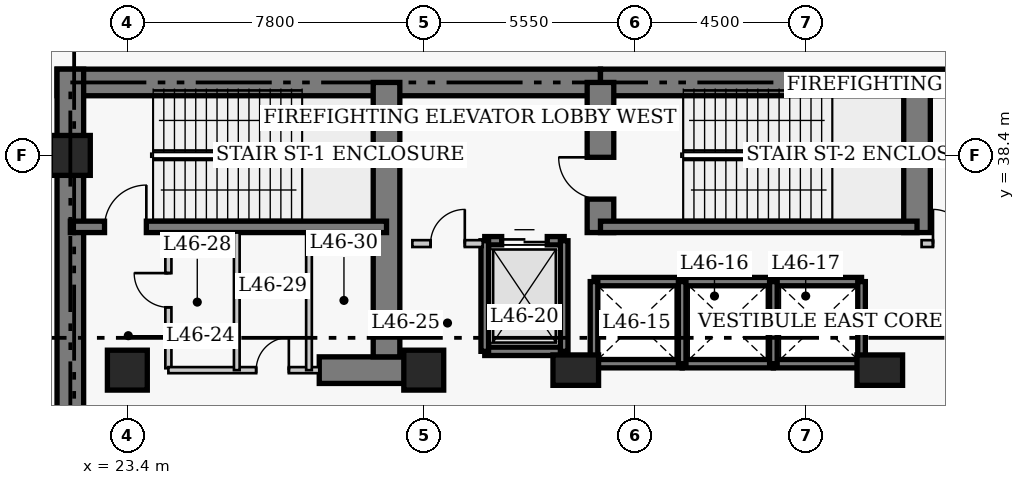
"""IFC4 building model, lengths in metres.
Left out: names, types, materials, properties, quantities, classifications, styles, units other than length and angle.
Written with IfcOpenShell. Run it as: python <this file> out.ifc"""

import sys

from ifc_helpers import new_model, si_unit, direction, frame, frame_2d, origin, origin_2d, place, context, subcontext, project, spatial, rectangle, extrude, element, fill, save


model = new_model("IFC4")
c1 = context("Model", 3, precision=1e-05, world=origin(), true_north=direction((0.0, 1.0)))
c2 = subcontext(c1, "Body", "Model", "MODEL_VIEW")
j1 = project(units=[si_unit("LENGTHUNIT", "METRE"), si_unit("PLANEANGLEUNIT", "RADIAN")], contexts=[c1])
p1 = place(None, origin())
s1 = spatial("IfcSite", under=j1, at=p1, CompositionType="ELEMENT")
p2 = place(p1, origin())
s2 = spatial("IfcBuilding", under=s1, at=p2, CompositionType="ELEMENT")
p3 = place(p2, frame((0.0, 0.0, 184.0)))
s3 = spatial("IfcBuildingStorey", under=s2, at=p3, CompositionType="ELEMENT", Elevation=184.0)
p4 = place(p3, frame((21.55, 40.32, 0.0), z_axis=(0.0, 0.0, 1.0), x_axis=(1.0, 0.0, 0.0)))
e1 = element("IfcWall", 1, at=p4, inside=s3, PredefinedType="SHEAR", context=c2, shape_type="SweptSolid", body=[
    extrude(rectangle(XDim=14.3, YDim=0.7, at=frame_2d((7.15, 0.0))), origin(), (0.0, 0.0, 1.0), 5.0),
])
p5 = place(p3, frame((35.85, 40.32, 0.0), z_axis=(0.0, 0.0, 1.0), x_axis=(1.0, 0.0, 0.0)))
e2 = element("IfcWall", 2, at=p5, inside=s3, PredefinedType="SHEAR", context=c2, shape_type="SweptSolid", body=[
    extrude(rectangle(XDim=12.6, YDim=0.7, at=frame_2d((6.3, 0.0))), origin(), (0.0, 0.0, 1.0), 5.0),
])
p6 = place(p3, frame((21.9, 27.05, 0.0), z_axis=(0.0, 0.0, 1.0), x_axis=(0.0, 1.0, 0.0)))
e3 = element("IfcWall", 3, at=p6, inside=s3, PredefinedType="SHEAR", context=c2, shape_type="SweptSolid", body=[
    extrude(rectangle(XDim=13.62, YDim=0.7, at=frame_2d((6.81, 0.0))), origin(), (0.0, 0.0, 1.0), 5.0),
])
p7 = place(p3, frame((28.45, 32.75, 0.0), z_axis=(0.0, 0.0, 1.0), x_axis=(1.0, 0.0, 0.0)))
e4 = element("IfcWall", 4, at=p7, inside=s3, PredefinedType="SHEAR", context=c2, shape_type="SweptSolid", body=[
    extrude(rectangle(XDim=2.4, YDim=0.7, at=frame_2d((1.2, 0.0))), origin(), (0.0, 0.0, 1.0), 5.0),
])
p8 = place(p3, frame((30.22, 33.1, 0.0), z_axis=(0.0, 0.0, 1.0), x_axis=(0.0, 1.0, 0.0)))
e5 = element("IfcWall", 5, at=p8, inside=s3, PredefinedType="SHEAR", context=c2, shape_type="SweptSolid", body=[
    extrude(rectangle(XDim=7.22, YDim=0.7, at=frame_2d((3.61, 0.0))), origin(), (0.0, 0.0, 1.0), 5.0),
])
p9 = place(p3, frame((35.85, 36.37, 0.0), z_axis=(0.0, 0.0, 1.0), x_axis=(0.0, 1.0, 0.0)))
e6 = element("IfcWall", 6, at=p9, inside=s3, PredefinedType="SHEAR", context=c2, shape_type="SweptSolid", body=[
    extrude(rectangle(XDim=3.95, YDim=0.7, at=frame_2d((1.975, 0.0))), origin(), (0.0, 0.0, 1.0), 5.0),
])
p10 = place(p9, frame((0.88, 0.0, 0.0)))
e7 = element("IfcOpeningElement", 7, at=p10, cuts=e6, PredefinedType="OPENING", context=c2, shape_type="SweptSolid", body=[
    extrude(rectangle(XDim=1.1, YDim=2.15, at=frame_2d((0.55, 1.075))), frame((0.0, 0.36, 0.0), z_axis=(0.0, -1.0, 0.0), x_axis=(1.0, 0.0, 0.0)), (0.0, 0.0, 1.0), 0.72),
])
p11 = place(p3, frame((44.18, 36.37, 0.0), z_axis=(0.0, 0.0, 1.0), x_axis=(0.0, 1.0, 0.0)))
e8 = element("IfcWall", 8, at=p11, inside=s3, PredefinedType="SHEAR", context=c2, shape_type="SweptSolid", body=[
    extrude(rectangle(XDim=3.95, YDim=0.7, at=frame_2d((1.975, 0.0))), origin(), (0.0, 0.0, 1.0), 5.0),
])
p12 = place(p3, frame((21.9, 36.52, 0.0), z_axis=(0.0, 0.0, 1.0), x_axis=(1.0, 0.0, 0.0)))
e9 = element("IfcWall", 9, at=p12, inside=s3, PredefinedType="SHEAR", context=c2, shape_type="SweptSolid", body=[
    extrude(rectangle(XDim=8.32, YDim=0.3, at=frame_2d((4.16, 0.0))), origin(), (0.0, 0.0, 1.0), 5.0),
])
p13 = place(p12, frame((0.9, 0.0, 0.0)))
e10 = element("IfcOpeningElement", 10, at=p13, cuts=e9, PredefinedType="OPENING", context=c2, shape_type="SweptSolid", body=[
    extrude(rectangle(XDim=1.1, YDim=2.15, at=frame_2d((0.55, 1.075))), frame((0.0, 0.16, 0.0), z_axis=(0.0, -1.0, 0.0), x_axis=(1.0, 0.0, 0.0)), (0.0, 0.0, 1.0), 0.32),
])
p14 = place(p3, frame((35.85, 36.52, 0.0), z_axis=(0.0, 0.0, 1.0), x_axis=(1.0, 0.0, 0.0)))
e11 = element("IfcWall", 11, at=p14, inside=s3, PredefinedType="SHEAR", context=c2, shape_type="SweptSolid", body=[
    extrude(rectangle(XDim=8.33, YDim=0.3, at=frame_2d((4.165, 0.0))), origin(), (0.0, 0.0, 1.0), 5.0),
])
for number, where, z_axis, x_axis in (
    (12, (21.9, 38.4, 0.0), (0.0, 0.0, 1.0), (1.0, 0.0, 0.0)),
    (13, (23.4, 32.75, 0.0), (0.0, 0.0, 1.0), (1.0, 0.0, 0.0)),
    (14, (31.2, 32.75, 0.0), (0.0, 0.0, 1.0), (1.0, 0.0, 0.0)),
):
    element("IfcColumn", number, at=place(p3, frame(where, z_axis=z_axis, x_axis=x_axis)), inside=s3, PredefinedType="COLUMN", context=c2, shape_type="SweptSolid", body=[
        extrude(rectangle(XDim=1.05, YDim=1.05, at=origin_2d()), origin(), (0.0, 0.0, 1.0), 5.0),
    ])
for number, where, z_axis, x_axis in (
    (15, (35.2, 32.75, 0.0), (0.0, 0.0, 1.0), (1.0, 0.0, 0.0)),
    (16, (43.2, 32.75, 0.0), (0.0, 0.0, 1.0), (1.0, 0.0, 0.0)),
):
    element("IfcColumn", number, at=place(p3, frame(where, z_axis=z_axis, x_axis=x_axis)), inside=s3, PredefinedType="COLUMN", context=c2, shape_type="SweptSolid", body=[
        extrude(rectangle(XDim=1.2, YDim=0.8, at=origin_2d()), origin(), (0.0, 0.0, 1.0), 5.0),
    ])
for number, where, z_axis, x_axis in (
    (17, (35.68, 35.08, 0.0), (0.0, 0.0, 1.0), (1.0, 0.0, 0.0)),
    (18, (35.68, 32.92, 0.0), (0.0, 0.0, 1.0), (1.0, 0.0, 0.0)),
):
    element("IfcWall", number, at=place(p3, frame(where, z_axis=z_axis, x_axis=x_axis)), inside=s3, PredefinedType="SHEAR", context=c2, shape_type="SweptSolid", body=[
        extrude(rectangle(XDim=2.32, YDim=0.22, at=frame_2d((1.16, 0.0))), origin(), (0.0, 0.0, 1.0), 5.0),
    ])
p15 = place(p3, frame((35.68, 32.92, 0.0), z_axis=(0.0, 0.0, 1.0), x_axis=(0.0, 1.0, 0.0)))
e19 = element("IfcWall", 19, at=p15, inside=s3, PredefinedType="SHEAR", context=c2, shape_type="SweptSolid", body=[
    extrude(rectangle(XDim=2.16, YDim=0.2, at=frame_2d((1.08, 0.0))), origin(), (0.0, 0.0, 1.0), 5.0),
])
for number, where, z_axis, x_axis in (
    (20, (38.0, 35.08, 0.0), (0.0, 0.0, 1.0), (1.0, 0.0, 0.0)),
    (21, (38.0, 32.92, 0.0), (0.0, 0.0, 1.0), (1.0, 0.0, 0.0)),
):
    element("IfcWall", number, at=place(p3, frame(where, z_axis=z_axis, x_axis=x_axis)), inside=s3, PredefinedType="SHEAR", context=c2, shape_type="SweptSolid", body=[
        extrude(rectangle(XDim=2.4, YDim=0.22, at=frame_2d((1.2, 0.0))), origin(), (0.0, 0.0, 1.0), 5.0),
    ])
p16 = place(p3, frame((38.0, 32.92, 0.0), z_axis=(0.0, 0.0, 1.0), x_axis=(0.0, 1.0, 0.0)))
e22 = element("IfcWall", 22, at=p16, inside=s3, PredefinedType="SHEAR", context=c2, shape_type="SweptSolid", body=[
    extrude(rectangle(XDim=2.16, YDim=0.2, at=frame_2d((1.08, 0.0))), origin(), (0.0, 0.0, 1.0), 5.0),
])
for number, where, z_axis, x_axis in (
    (23, (40.4, 35.08, 0.0), (0.0, 0.0, 1.0), (1.0, 0.0, 0.0)),
    (24, (40.4, 32.92, 0.0), (0.0, 0.0, 1.0), (1.0, 0.0, 0.0)),
):
    element("IfcWall", number, at=place(p3, frame(where, z_axis=z_axis, x_axis=x_axis)), inside=s3, PredefinedType="SHEAR", context=c2, shape_type="SweptSolid", body=[
        extrude(rectangle(XDim=2.32, YDim=0.22, at=frame_2d((1.16, 0.0))), origin(), (0.0, 0.0, 1.0), 5.0),
    ])
for number, where, z_axis, x_axis in (
    (25, (40.4, 32.92, 0.0), (0.0, 0.0, 1.0), (0.0, 1.0, 0.0)),
    (26, (42.72, 32.92, 0.0), (0.0, 0.0, 1.0), (0.0, 1.0, 0.0)),
):
    element("IfcWall", number, at=place(p3, frame(where, z_axis=z_axis, x_axis=x_axis)), inside=s3, PredefinedType="SHEAR", context=c2, shape_type="SweptSolid", body=[
        extrude(rectangle(XDim=2.16, YDim=0.2, at=frame_2d((1.08, 0.0))), origin(), (0.0, 0.0, 1.0), 5.0),
    ])
p17 = place(p3, frame((32.805, 36.155, 0.0), z_axis=(0.0, 0.0, 1.0), x_axis=(1.0, 0.0, 0.0)))
e27 = element("IfcWall", 27, at=p17, inside=s3, PredefinedType="SHEAR", context=c2, shape_type="SweptSolid", body=[
    extrude(rectangle(XDim=2.09, YDim=0.22, at=frame_2d((1.045, 0.0))), origin(), (0.0, 0.0, 1.0), 5.0),
])
p18 = place(p17, frame((0.445, 0.0, 0.0)))
e28 = element("IfcOpeningElement", 28, at=p18, cuts=e27, PredefinedType="OPENING", context=c2, shape_type="SweptSolid", body=[
    extrude(rectangle(XDim=1.2, YDim=2.15, at=frame_2d((0.6, 1.075))), frame((0.0, 0.12, 0.0), z_axis=(0.0, -1.0, 0.0), x_axis=(1.0, 0.0, 0.0)), (0.0, 0.0, 1.0), 0.24),
])
p19 = place(p3, frame((32.805, 33.245, 0.0), z_axis=(0.0, 0.0, 1.0), x_axis=(1.0, 0.0, 0.0)))
e29 = element("IfcWall", 29, at=p19, inside=s3, PredefinedType="SHEAR", context=c2, shape_type="SweptSolid", body=[
    extrude(rectangle(XDim=2.09, YDim=0.22, at=frame_2d((1.045, 0.0))), origin(), (0.0, 0.0, 1.0), 5.0),
])
for number, where, z_axis, x_axis in (
    (30, (32.805, 33.245, 0.0), (0.0, 0.0, 1.0), (0.0, 1.0, 0.0)),
    (31, (34.895, 33.245, 0.0), (0.0, 0.0, 1.0), (0.0, 1.0, 0.0)),
):
    element("IfcWall", number, at=place(p3, frame(where, z_axis=z_axis, x_axis=x_axis)), inside=s3, PredefinedType="SHEAR", context=c2, shape_type="SweptSolid", body=[
        extrude(rectangle(XDim=2.91, YDim=0.2, at=frame_2d((1.455, 0.0))), origin(), (0.0, 0.0, 1.0), 5.0),
    ])
p20 = place(p3, frame((30.9, 36.08, 0.0), z_axis=(0.0, 0.0, 1.0), x_axis=(1.0, 0.0, 0.0)))
e32 = element("IfcWall", 32, at=p20, inside=s3, PredefinedType="PARTITIONING", context=c2, shape_type="SweptSolid", body=[
    extrude(rectangle(XDim=1.85, YDim=0.18, at=frame_2d((0.925, 0.0))), origin(), (0.0, 0.0, 1.0), 4.75),
])
p21 = place(p20, frame((0.48, 0.0, 0.0)))
e33 = element("IfcOpeningElement", 33, at=p21, cuts=e32, PredefinedType="OPENING", context=c2, shape_type="SweptSolid", body=[
    extrude(rectangle(XDim=0.9, YDim=2.15, at=frame_2d((0.45, 1.075))), frame((0.0, 0.1, 0.0), z_axis=(0.0, -1.0, 0.0), x_axis=(1.0, 0.0, 0.0)), (0.0, 0.0, 1.0), 0.2),
])
p22 = place(p3, frame((44.3, 36.08, 0.0), z_axis=(0.0, 0.0, 1.0), x_axis=(1.0, 0.0, 0.0)))
e34 = element("IfcWall", 34, at=p22, inside=s3, PredefinedType="PARTITIONING", context=c2, shape_type="SweptSolid", body=[
    extrude(rectangle(XDim=1.5, YDim=0.18, at=frame_2d((0.75, 0.0))), origin(), (0.0, 0.0, 1.0), 4.75),
])
p23 = place(p22, frame((0.3, 0.0, 0.0)))
e35 = element("IfcOpeningElement", 35, at=p23, cuts=e34, PredefinedType="OPENING", context=c2, shape_type="SweptSolid", body=[
    extrude(rectangle(XDim=0.9, YDim=2.15, at=frame_2d((0.45, 1.075))), frame((0.0, 0.1, 0.0), z_axis=(0.0, -1.0, 0.0), x_axis=(1.0, 0.0, 0.0)), (0.0, 0.0, 1.0), 0.2),
])
p24 = place(p3, frame((24.48, 32.8, 0.0), z_axis=(0.0, 0.0, 1.0), x_axis=(0.0, 1.0, 0.0)))
e36 = element("IfcWall", 36, at=p24, inside=s3, PredefinedType="PARTITIONING", context=c2, shape_type="SweptSolid", body=[
    extrude(rectangle(XDim=3.57, YDim=0.16, at=frame_2d((1.785, 0.0))), origin(), (0.0, 0.0, 1.0), 4.75),
])
p25 = place(p24, frame((1.604, 0.0, 0.0)))
e37 = element("IfcOpeningElement", 37, at=p25, cuts=e36, PredefinedType="OPENING", context=c2, shape_type="SweptSolid", body=[
    extrude(rectangle(XDim=0.9, YDim=2.1, at=frame_2d((0.45, 1.05))), frame((0.0, 0.09, 0.0), z_axis=(0.0, -1.0, 0.0), x_axis=(1.0, 0.0, 0.0)), (0.0, 0.0, 1.0), 0.18),
])
p26 = place(p3, frame((24.48, 32.75, 0.0), z_axis=(0.0, 0.0, 1.0), x_axis=(1.0, 0.0, 0.0)))
e38 = element("IfcWall", 38, at=p26, inside=s3, PredefinedType="PARTITIONING", context=c2, shape_type="SweptSolid", body=[
    extrude(rectangle(XDim=3.97, YDim=0.16, at=frame_2d((1.985, 0.0))), origin(), (0.0, 0.0, 1.0), 4.75),
])
p27 = place(p26, frame((2.31, 0.0, 0.0)))
e39 = element("IfcOpeningElement", 39, at=p27, cuts=e38, PredefinedType="OPENING", context=c2, shape_type="SweptSolid", body=[
    extrude(rectangle(XDim=0.86, YDim=2.05, at=frame_2d((0.43, 1.025))), frame((0.0, 0.09, 0.0), z_axis=(0.0, -1.0, 0.0), x_axis=(1.0, 0.0, 0.0)), (0.0, 0.0, 1.0), 0.18),
])
for number, where, z_axis, x_axis in (
    (40, (26.28, 32.75, 0.0), (0.0, 0.0, 1.0), (0.0, 1.0, 0.0)),
    (41, (28.18, 32.75, 0.0), (0.0, 0.0, 1.0), (0.0, 1.0, 0.0)),
):
    element("IfcWall", number, at=place(p3, frame(where, z_axis=z_axis, x_axis=x_axis)), inside=s3, PredefinedType="PARTITIONING", context=c2, shape_type="SweptSolid", body=[
        extrude(rectangle(XDim=3.62, YDim=0.15, at=frame_2d((1.81, 0.0))), origin(), (0.0, 0.0, 1.0), 4.75),
    ])
p28 = place(p18, origin())
e42 = element("IfcDoor", 42, at=p28, inside=s3, OperationType="DOUBLE_DOOR_SLIDING", PredefinedType="DOOR", context=c2, shape_type="SweptSolid", body=[
    extrude(rectangle(XDim=1.2, YDim=2.15, at=frame_2d((0.6, 1.075))), frame((0.0, 0.025, 0.0), z_axis=(0.0, -1.0, 0.0), x_axis=(1.0, 0.0, 0.0)), (0.0, 0.0, 1.0), 0.05),
])
fill(e28, e42)
p29 = place(p21, origin())
e43 = element("IfcDoor", 43, at=p29, inside=s3, OperationType="SINGLE_SWING_RIGHT", PredefinedType="DOOR", context=c2, shape_type="SweptSolid", body=[
    extrude(rectangle(XDim=0.9, YDim=2.15, at=frame_2d((0.45, 1.075))), frame((0.0, 0.025, 0.0), z_axis=(0.0, -1.0, 0.0), x_axis=(1.0, 0.0, 0.0)), (0.0, 0.0, 1.0), 0.05),
])
fill(e33, e43)
p30 = place(p23, origin())
e44 = element("IfcDoor", 44, at=p30, inside=s3, OperationType="SINGLE_SWING_LEFT", PredefinedType="DOOR", context=c2, shape_type="SweptSolid", body=[
    extrude(rectangle(XDim=0.9, YDim=2.15, at=frame_2d((0.45, 1.075))), frame((0.0, 0.025, 0.0), z_axis=(0.0, -1.0, 0.0), x_axis=(1.0, 0.0, 0.0)), (0.0, 0.0, 1.0), 0.05),
])
fill(e35, e44)
p31 = place(p25, origin())
e45 = element("IfcDoor", 45, at=p31, inside=s3, OperationType="SINGLE_SWING_RIGHT", PredefinedType="DOOR", context=c2, shape_type="SweptSolid", body=[
    extrude(rectangle(XDim=0.9, YDim=2.1, at=frame_2d((0.45, 1.05))), frame((0.0, 0.025, 0.0), z_axis=(0.0, -1.0, 0.0), x_axis=(1.0, 0.0, 0.0)), (0.0, 0.0, 1.0), 0.05),
])
fill(e37, e45)
p32 = place(p27, origin())
e46 = element("IfcDoor", 46, at=p32, inside=s3, OperationType="SINGLE_SWING_RIGHT", PredefinedType="DOOR", context=c2, shape_type="SweptSolid", body=[
    extrude(rectangle(XDim=0.86, YDim=2.05, at=frame_2d((0.43, 1.025))), frame((0.0, 0.025, 0.0), z_axis=(0.0, -1.0, 0.0), x_axis=(1.0, 0.0, 0.0)), (0.0, 0.0, 1.0), 0.05),
])
fill(e39, e46)
p33 = place(p13, origin())
e47 = element("IfcDoor", 47, at=p33, inside=s3, OperationType="SINGLE_SWING_RIGHT", PredefinedType="DOOR", context=c2, shape_type="SweptSolid", body=[
    extrude(rectangle(XDim=1.1, YDim=2.15, at=frame_2d((0.55, 1.075))), frame((0.0, 0.025, 0.0), z_axis=(0.0, -1.0, 0.0), x_axis=(1.0, 0.0, 0.0)), (0.0, 0.0, 1.0), 0.05),
])
fill(e10, e47)
p34 = place(p10, origin())
e48 = element("IfcDoor", 48, at=p34, inside=s3, OperationType="SINGLE_SWING_RIGHT", PredefinedType="DOOR", context=c2, shape_type="SweptSolid", body=[
    extrude(rectangle(XDim=1.1, YDim=2.15, at=frame_2d((0.55, 1.075))), frame((0.0, 0.025, 0.0), z_axis=(0.0, -1.0, 0.0), x_axis=(1.0, 0.0, 0.0)), (0.0, 0.0, 1.0), 0.05),
])
fill(e7, e48)
save(model, sys.argv[1])
